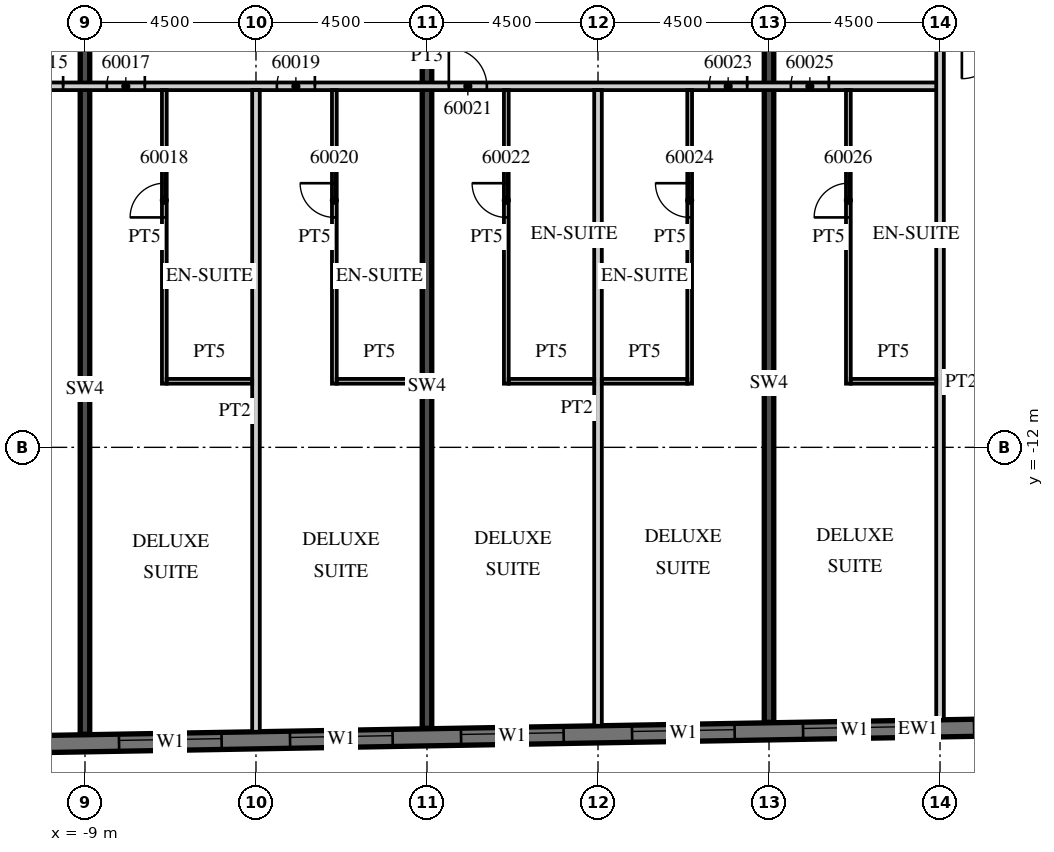
"""IFC4 building model, lengths in metres.
Left out: names, types, materials, properties, quantities, classifications, styles, units other than length and angle.
Written with IfcOpenShell. Run it as: python <this file> out.ifc"""

import sys

from ifc_helpers import new_model, si_unit, direction, frame, frame_2d, origin, place, context, subcontext, project, spatial, rectangle, extrude, element, fill, save


model = new_model("IFC4")
c1 = context("Model", 3, precision=1e-05, world=origin(), true_north=direction((0.0, 1.0)))
c2 = subcontext(c1, "Body", "Model", "MODEL_VIEW")
j1 = project(units=[si_unit("LENGTHUNIT", "METRE"), si_unit("PLANEANGLEUNIT", "RADIAN")], contexts=[c1])
p1 = place(None, origin())
s1 = spatial("IfcSite", under=j1, at=p1, CompositionType="ELEMENT")
p2 = place(p1, origin())
s2 = spatial("IfcBuilding", under=s1, at=p2, CompositionType="ELEMENT")
p3 = place(p2, frame((0.0, 0.0, 244.1)))
s3 = spatial("IfcBuildingStorey", under=s2, at=p3, CompositionType="ELEMENT", Elevation=244.1)
p4 = place(p3, frame((-9.0, -19.55, 0.0), z_axis=(0.0, 0.0, 1.0), x_axis=(0.0, 1.0, 0.0)))
e1 = element("IfcWall", 1, at=p4, inside=s3, PredefinedType="SHEAR", context=c2, shape_type="SweptSolid", body=[
    extrude(rectangle(XDim=18.15, YDim=0.25, at=frame_2d((9.075, 0.0))), origin(), (0.0, 0.0, 1.0), 3.3),
])
p5 = place(p3, frame((0.0, -19.393, 0.0), z_axis=(0.0, 0.0, 1.0), x_axis=(0.0, 1.0, 0.0)))
e2 = element("IfcWall", 2, at=p5, inside=s3, PredefinedType="SHEAR", context=c2, shape_type="SweptSolid", body=[
    extrude(rectangle(XDim=17.993, YDim=0.25, at=frame_2d((8.997, 0.0))), origin(), (0.0, 0.0, 1.0), 3.3),
])
p6 = place(p3, frame((9.0, -19.236, 0.0), z_axis=(0.0, 0.0, 1.0), x_axis=(0.0, 1.0, 0.0)))
e3 = element("IfcWall", 3, at=p6, inside=s3, PredefinedType="SHEAR", context=c2, shape_type="SweptSolid", body=[
    extrude(rectangle(XDim=17.836, YDim=0.25, at=frame_2d((8.918, 0.0))), origin(), (0.0, 0.0, 1.0), 3.3),
])
p7 = place(p3, frame((-13.504, -19.866, 0.0), z_axis=(0.0, 0.0, 1.0), x_axis=(0.999847672978, 0.017453676992, 0.0)))
e4 = element("IfcWall", 4, at=p7, inside=s3, PredefinedType="SOLIDWALL", context=c2, shape_type="SweptSolid", body=[
    extrude(rectangle(XDim=52.86, YDim=0.45, at=frame_2d((26.43, 0.0))), origin(), (0.0, 0.0, 1.0), 3.02),
])
p8 = place(p7, frame((0.9, 0.0, 0.45)))
e5 = element("IfcOpeningElement", 5, at=p8, cuts=e4, PredefinedType="OPENING", context=c2, shape_type="SweptSolid", body=[
    extrude(rectangle(XDim=2.7, YDim=2.25, at=frame_2d((1.35, 1.125))), frame((0.0, 0.235, 0.0), z_axis=(0.0, -1.0, 0.0), x_axis=(1.0, 0.0, 0.0)), (0.0, 0.0, 1.0), 0.47),
])
p9 = place(p7, frame((5.401, 0.0, 0.45)))
e6 = element("IfcOpeningElement", 6, at=p9, cuts=e4, PredefinedType="OPENING", context=c2, shape_type="SweptSolid", body=[
    extrude(rectangle(XDim=2.7, YDim=2.25, at=frame_2d((1.35, 1.125))), frame((0.0, 0.235, 0.0), z_axis=(0.0, -1.0, 0.0), x_axis=(1.0, 0.0, 0.0)), (0.0, 0.0, 1.0), 0.47),
])
p10 = place(p7, frame((9.902, 0.0, 0.45)))
e7 = element("IfcOpeningElement", 7, at=p10, cuts=e4, PredefinedType="OPENING", context=c2, shape_type="SweptSolid", body=[
    extrude(rectangle(XDim=2.7, YDim=2.25, at=frame_2d((1.35, 1.125))), frame((0.0, 0.235, 0.0), z_axis=(0.0, -1.0, 0.0), x_axis=(1.0, 0.0, 0.0)), (0.0, 0.0, 1.0), 0.47),
])
p11 = place(p7, frame((14.402, 0.0, 0.45)))
e8 = element("IfcOpeningElement", 8, at=p11, cuts=e4, PredefinedType="OPENING", context=c2, shape_type="SweptSolid", body=[
    extrude(rectangle(XDim=2.7, YDim=2.25, at=frame_2d((1.35, 1.125))), frame((0.0, 0.235, 0.0), z_axis=(0.0, -1.0, 0.0), x_axis=(1.0, 0.0, 0.0)), (0.0, 0.0, 1.0), 0.47),
])
p12 = place(p7, frame((18.903, 0.0, 0.45)))
e9 = element("IfcOpeningElement", 9, at=p12, cuts=e4, PredefinedType="OPENING", context=c2, shape_type="SweptSolid", body=[
    extrude(rectangle(XDim=2.7, YDim=2.25, at=frame_2d((1.35, 1.125))), frame((0.0, 0.235, 0.0), z_axis=(0.0, -1.0, 0.0), x_axis=(1.0, 0.0, 0.0)), (0.0, 0.0, 1.0), 0.47),
])
p13 = place(p7, frame((23.404, 0.0, 0.45)))
e10 = element("IfcOpeningElement", 10, at=p13, cuts=e4, PredefinedType="OPENING", context=c2, shape_type="SweptSolid", body=[
    extrude(rectangle(XDim=2.7, YDim=2.25, at=frame_2d((1.35, 1.125))), frame((0.0, 0.235, 0.0), z_axis=(0.0, -1.0, 0.0), x_axis=(1.0, 0.0, 0.0)), (0.0, 0.0, 1.0), 0.47),
])
p14 = place(p7, frame((27.904, 0.0, 0.45)))
e11 = element("IfcOpeningElement", 11, at=p14, cuts=e4, PredefinedType="OPENING", context=c2, shape_type="SweptSolid", body=[
    extrude(rectangle(XDim=2.7, YDim=2.25, at=frame_2d((1.35, 1.125))), frame((0.0, 0.235, 0.0), z_axis=(0.0, -1.0, 0.0), x_axis=(1.0, 0.0, 0.0)), (0.0, 0.0, 1.0), 0.47),
])
p15 = place(p7, frame((32.405, 0.0, 0.45)))
e12 = element("IfcOpeningElement", 12, at=p15, cuts=e4, PredefinedType="OPENING", context=c2, shape_type="SweptSolid", body=[
    extrude(rectangle(XDim=2.7, YDim=2.25, at=frame_2d((1.35, 1.125))), frame((0.0, 0.235, 0.0), z_axis=(0.0, -1.0, 0.0), x_axis=(1.0, 0.0, 0.0)), (0.0, 0.0, 1.0), 0.47),
])
p16 = place(p7, frame((36.906, 0.0, 0.45)))
e13 = element("IfcOpeningElement", 13, at=p16, cuts=e4, PredefinedType="OPENING", context=c2, shape_type="SweptSolid", body=[
    extrude(rectangle(XDim=2.7, YDim=2.25, at=frame_2d((1.35, 1.125))), frame((0.0, 0.235, 0.0), z_axis=(0.0, -1.0, 0.0), x_axis=(1.0, 0.0, 0.0)), (0.0, 0.0, 1.0), 0.47),
])
p17 = place(p7, frame((41.406, 0.0, 0.45)))
e14 = element("IfcOpeningElement", 14, at=p17, cuts=e4, PredefinedType="OPENING", context=c2, shape_type="SweptSolid", body=[
    extrude(rectangle(XDim=2.7, YDim=2.25, at=frame_2d((1.35, 1.125))), frame((0.0, 0.235, 0.0), z_axis=(0.0, -1.0, 0.0), x_axis=(1.0, 0.0, 0.0)), (0.0, 0.0, 1.0), 0.47),
])
p18 = place(p7, frame((45.907, 0.0, 0.45)))
e15 = element("IfcOpeningElement", 15, at=p18, cuts=e4, PredefinedType="OPENING", context=c2, shape_type="SweptSolid", body=[
    extrude(rectangle(XDim=2.7, YDim=2.25, at=frame_2d((1.35, 1.125))), frame((0.0, 0.235, 0.0), z_axis=(0.0, -1.0, 0.0), x_axis=(1.0, 0.0, 0.0)), (0.0, 0.0, 1.0), 0.47),
])
p19 = place(p3, frame((-13.5, -2.5, 0.0), z_axis=(0.0, 0.0, 1.0), x_axis=(1.0, 0.0, 0.0)))
e16 = element("IfcWall", 16, at=p19, inside=s3, PredefinedType="PARTITIONING", context=c2, shape_type="SweptSolid", body=[
    extrude(rectangle(XDim=27.0, YDim=0.2, at=frame_2d((13.5, 0.0))), origin(), (0.0, 0.0, 1.0), 3.02),
])
p20 = place(p19, frame((2.925, 0.0, 0.0)))
e17 = element("IfcOpeningElement", 17, at=p20, cuts=e16, PredefinedType="OPENING", context=c2, shape_type="SweptSolid", body=[
    extrude(rectangle(XDim=1.0, YDim=2.1, at=frame_2d((0.5, 1.05))), frame((0.0, 0.11, 0.0), z_axis=(0.0, -1.0, 0.0), x_axis=(1.0, 0.0, 0.0)), (0.0, 0.0, 1.0), 0.22),
])
p21 = place(p19, frame((5.075, 0.0, 0.0)))
e18 = element("IfcOpeningElement", 18, at=p21, cuts=e16, PredefinedType="OPENING", context=c2, shape_type="SweptSolid", body=[
    extrude(rectangle(XDim=1.0, YDim=2.1, at=frame_2d((0.5, 1.05))), frame((0.0, 0.11, 0.0), z_axis=(0.0, -1.0, 0.0), x_axis=(1.0, 0.0, 0.0)), (0.0, 0.0, 1.0), 0.22),
])
p22 = place(p19, frame((9.55, 0.0, 0.0)))
e19 = element("IfcOpeningElement", 19, at=p22, cuts=e16, PredefinedType="OPENING", context=c2, shape_type="SweptSolid", body=[
    extrude(rectangle(XDim=1.0, YDim=2.1, at=frame_2d((0.5, 1.05))), frame((0.0, 0.11, 0.0), z_axis=(0.0, -1.0, 0.0), x_axis=(1.0, 0.0, 0.0)), (0.0, 0.0, 1.0), 0.22),
])
p23 = place(p19, frame((14.075, 0.0, 0.0)))
e20 = element("IfcOpeningElement", 20, at=p23, cuts=e16, PredefinedType="OPENING", context=c2, shape_type="SweptSolid", body=[
    extrude(rectangle(XDim=1.0, YDim=2.1, at=frame_2d((0.5, 1.05))), frame((0.0, 0.11, 0.0), z_axis=(0.0, -1.0, 0.0), x_axis=(1.0, 0.0, 0.0)), (0.0, 0.0, 1.0), 0.22),
])
p24 = place(p19, frame((20.925, 0.0, 0.0)))
e21 = element("IfcOpeningElement", 21, at=p24, cuts=e16, PredefinedType="OPENING", context=c2, shape_type="SweptSolid", body=[
    extrude(rectangle(XDim=1.0, YDim=2.1, at=frame_2d((0.5, 1.05))), frame((0.0, 0.11, 0.0), z_axis=(0.0, -1.0, 0.0), x_axis=(1.0, 0.0, 0.0)), (0.0, 0.0, 1.0), 0.22),
])
p25 = place(p19, frame((23.075, 0.0, 0.0)))
e22 = element("IfcOpeningElement", 22, at=p25, cuts=e16, PredefinedType="OPENING", context=c2, shape_type="SweptSolid", body=[
    extrude(rectangle(XDim=1.0, YDim=2.1, at=frame_2d((0.5, 1.05))), frame((0.0, 0.11, 0.0), z_axis=(0.0, -1.0, 0.0), x_axis=(1.0, 0.0, 0.0)), (0.0, 0.0, 1.0), 0.22),
])
p26 = place(p3, frame((-4.5, -19.484, 0.0), z_axis=(0.0, 0.0, 1.0), x_axis=(0.0, 1.0, 0.0)))
e23 = element("IfcWall", 23, at=p26, inside=s3, PredefinedType="PARTITIONING", context=c2, shape_type="SweptSolid", body=[
    extrude(rectangle(XDim=16.884, YDim=0.2, at=frame_2d((8.442, 0.0))), origin(), (0.0, 0.0, 1.0), 3.02),
])
p27 = place(p3, frame((-6.912, -10.325, 0.0), z_axis=(0.0, 0.0, 1.0), x_axis=(0.0, 1.0, 0.0)))
e24 = element("IfcWall", 24, at=p27, inside=s3, PredefinedType="PARTITIONING", context=c2, shape_type="SweptSolid", body=[
    extrude(rectangle(XDim=7.725, YDim=0.125, at=frame_2d((3.862, 0.0))), origin(), (0.0, 0.0, 1.0), 3.02),
])
p28 = place(p27, frame((4.375, 0.0, 0.0)))
e25 = element("IfcOpeningElement", 25, at=p28, cuts=e24, PredefinedType="OPENING", context=c2, shape_type="SweptSolid", body=[
    extrude(rectangle(XDim=0.9, YDim=2.1, at=frame_2d((0.45, 1.05))), frame((0.0, 0.073, 0.0), z_axis=(0.0, -1.0, 0.0), x_axis=(1.0, 0.0, 0.0)), (0.0, 0.0, 1.0), 0.145),
])
p29 = place(p3, frame((-6.85, -10.262, 0.0), z_axis=(0.0, 0.0, 1.0), x_axis=(1.0, 0.0, 0.0)))
e26 = element("IfcWall", 26, at=p29, inside=s3, PredefinedType="PARTITIONING", context=c2, shape_type="SweptSolid", body=[
    extrude(rectangle(XDim=2.25, YDim=0.125, at=frame_2d((1.125, 0.0))), origin(), (0.0, 0.0, 1.0), 3.02),
])
p30 = place(p3, frame((-2.438, -10.325, 0.0), z_axis=(0.0, 0.0, 1.0), x_axis=(0.0, 1.0, 0.0)))
e27 = element("IfcWall", 27, at=p30, inside=s3, PredefinedType="PARTITIONING", context=c2, shape_type="SweptSolid", body=[
    extrude(rectangle(XDim=7.725, YDim=0.125, at=frame_2d((3.862, 0.0))), origin(), (0.0, 0.0, 1.0), 3.02),
])
p31 = place(p30, frame((4.375, 0.0, 0.0)))
e28 = element("IfcOpeningElement", 28, at=p31, cuts=e27, PredefinedType="OPENING", context=c2, shape_type="SweptSolid", body=[
    extrude(rectangle(XDim=0.9, YDim=2.1, at=frame_2d((0.45, 1.05))), frame((0.0, 0.073, 0.0), z_axis=(0.0, -1.0, 0.0), x_axis=(1.0, 0.0, 0.0)), (0.0, 0.0, 1.0), 0.145),
])
p32 = place(p3, frame((-2.375, -10.262, 0.0), z_axis=(0.0, 0.0, 1.0), x_axis=(1.0, 0.0, 0.0)))
e29 = element("IfcWall", 29, at=p32, inside=s3, PredefinedType="PARTITIONING", context=c2, shape_type="SweptSolid", body=[
    extrude(rectangle(XDim=2.25, YDim=0.125, at=frame_2d((1.125, 0.0))), origin(), (0.0, 0.0, 1.0), 3.02),
])
p33 = place(p3, frame((4.5, -19.327, 0.0), z_axis=(0.0, 0.0, 1.0), x_axis=(0.0, 1.0, 0.0)))
e30 = element("IfcWall", 30, at=p33, inside=s3, PredefinedType="PARTITIONING", context=c2, shape_type="SweptSolid", body=[
    extrude(rectangle(XDim=16.727, YDim=0.2, at=frame_2d((8.363, 0.0))), origin(), (0.0, 0.0, 1.0), 3.02),
])
p34 = place(p3, frame((2.087, -10.325, 0.0), z_axis=(0.0, 0.0, 1.0), x_axis=(0.0, 1.0, 0.0)))
e31 = element("IfcWall", 31, at=p34, inside=s3, PredefinedType="PARTITIONING", context=c2, shape_type="SweptSolid", body=[
    extrude(rectangle(XDim=7.725, YDim=0.125, at=frame_2d((3.862, 0.0))), origin(), (0.0, 0.0, 1.0), 3.02),
])
p35 = place(p34, frame((4.375, 0.0, 0.0)))
e32 = element("IfcOpeningElement", 32, at=p35, cuts=e31, PredefinedType="OPENING", context=c2, shape_type="SweptSolid", body=[
    extrude(rectangle(XDim=0.9, YDim=2.1, at=frame_2d((0.45, 1.05))), frame((0.0, 0.073, 0.0), z_axis=(0.0, -1.0, 0.0), x_axis=(1.0, 0.0, 0.0)), (0.0, 0.0, 1.0), 0.145),
])
p36 = place(p3, frame((2.15, -10.262, 0.0), z_axis=(0.0, 0.0, 1.0), x_axis=(1.0, 0.0, 0.0)))
e33 = element("IfcWall", 33, at=p36, inside=s3, PredefinedType="PARTITIONING", context=c2, shape_type="SweptSolid", body=[
    extrude(rectangle(XDim=2.25, YDim=0.125, at=frame_2d((1.125, 0.0))), origin(), (0.0, 0.0, 1.0), 3.02),
])
p37 = place(p3, frame((6.912, -10.325, 0.0), z_axis=(0.0, 0.0, 1.0), x_axis=(0.0, 1.0, 0.0)))
e34 = element("IfcWall", 34, at=p37, inside=s3, PredefinedType="PARTITIONING", context=c2, shape_type="SweptSolid", body=[
    extrude(rectangle(XDim=7.725, YDim=0.125, at=frame_2d((3.862, 0.0))), origin(), (0.0, 0.0, 1.0), 3.02),
])
p38 = place(p37, frame((4.375, 0.0, 0.0)))
e35 = element("IfcOpeningElement", 35, at=p38, cuts=e34, PredefinedType="OPENING", context=c2, shape_type="SweptSolid", body=[
    extrude(rectangle(XDim=0.9, YDim=2.1, at=frame_2d((0.45, 1.05))), frame((0.0, 0.073, 0.0), z_axis=(0.0, -1.0, 0.0), x_axis=(1.0, 0.0, 0.0)), (0.0, 0.0, 1.0), 0.145),
])
p39 = place(p3, frame((4.6, -10.262, 0.0), z_axis=(0.0, 0.0, 1.0), x_axis=(1.0, 0.0, 0.0)))
e36 = element("IfcWall", 36, at=p39, inside=s3, PredefinedType="PARTITIONING", context=c2, shape_type="SweptSolid", body=[
    extrude(rectangle(XDim=2.25, YDim=0.125, at=frame_2d((1.125, 0.0))), origin(), (0.0, 0.0, 1.0), 3.02),
])
p40 = place(p3, frame((13.5, -19.17, 0.0), z_axis=(0.0, 0.0, 1.0), x_axis=(0.0, 1.0, 0.0)))
e37 = element("IfcWall", 37, at=p40, inside=s3, PredefinedType="PARTITIONING", context=c2, shape_type="SweptSolid", body=[
    extrude(rectangle(XDim=17.77, YDim=0.2, at=frame_2d((8.885, 0.0))), origin(), (0.0, 0.0, 1.0), 3.02),
])
p41 = place(p3, frame((11.088, -10.325, 0.0), z_axis=(0.0, 0.0, 1.0), x_axis=(0.0, 1.0, 0.0)))
e38 = element("IfcWall", 38, at=p41, inside=s3, PredefinedType="PARTITIONING", context=c2, shape_type="SweptSolid", body=[
    extrude(rectangle(XDim=7.725, YDim=0.125, at=frame_2d((3.862, 0.0))), origin(), (0.0, 0.0, 1.0), 3.02),
])
p42 = place(p41, frame((4.375, 0.0, 0.0)))
e39 = element("IfcOpeningElement", 39, at=p42, cuts=e38, PredefinedType="OPENING", context=c2, shape_type="SweptSolid", body=[
    extrude(rectangle(XDim=0.9, YDim=2.1, at=frame_2d((0.45, 1.05))), frame((0.0, 0.073, 0.0), z_axis=(0.0, -1.0, 0.0), x_axis=(1.0, 0.0, 0.0)), (0.0, 0.0, 1.0), 0.145),
])
p43 = place(p3, frame((11.15, -10.262, 0.0), z_axis=(0.0, 0.0, 1.0), x_axis=(1.0, 0.0, 0.0)))
e40 = element("IfcWall", 40, at=p43, inside=s3, PredefinedType="PARTITIONING", context=c2, shape_type="SweptSolid", body=[
    extrude(rectangle(XDim=2.25, YDim=0.125, at=frame_2d((1.125, 0.0))), origin(), (0.0, 0.0, 1.0), 3.02),
])
p44 = place(p9, origin())
e41 = element("IfcWindow", 41, at=p44, inside=s3, PartitioningType="SINGLE_PANEL", PredefinedType="WINDOW", context=c2, shape_type="SweptSolid", body=[
    extrude(rectangle(XDim=2.7, YDim=2.25, at=frame_2d((1.35, 1.125))), frame((0.0, 0.09, 0.0), z_axis=(0.0, -1.0, 0.0), x_axis=(1.0, 0.0, 0.0)), (0.0, 0.0, 1.0), 0.06),
])
fill(e6, e41)
p45 = place(p10, origin())
e42 = element("IfcWindow", 42, at=p45, inside=s3, PartitioningType="SINGLE_PANEL", PredefinedType="WINDOW", context=c2, shape_type="SweptSolid", body=[
    extrude(rectangle(XDim=2.7, YDim=2.25, at=frame_2d((1.35, 1.125))), frame((0.0, 0.09, 0.0), z_axis=(0.0, -1.0, 0.0), x_axis=(1.0, 0.0, 0.0)), (0.0, 0.0, 1.0), 0.06),
])
fill(e7, e42)
p46 = place(p11, origin())
e43 = element("IfcWindow", 43, at=p46, inside=s3, PartitioningType="SINGLE_PANEL", PredefinedType="WINDOW", context=c2, shape_type="SweptSolid", body=[
    extrude(rectangle(XDim=2.7, YDim=2.25, at=frame_2d((1.35, 1.125))), frame((0.0, 0.09, 0.0), z_axis=(0.0, -1.0, 0.0), x_axis=(1.0, 0.0, 0.0)), (0.0, 0.0, 1.0), 0.06),
])
fill(e8, e43)
p47 = place(p12, origin())
e44 = element("IfcWindow", 44, at=p47, inside=s3, PartitioningType="SINGLE_PANEL", PredefinedType="WINDOW", context=c2, shape_type="SweptSolid", body=[
    extrude(rectangle(XDim=2.7, YDim=2.25, at=frame_2d((1.35, 1.125))), frame((0.0, 0.09, 0.0), z_axis=(0.0, -1.0, 0.0), x_axis=(1.0, 0.0, 0.0)), (0.0, 0.0, 1.0), 0.06),
])
fill(e9, e44)
p48 = place(p13, origin())
e45 = element("IfcWindow", 45, at=p48, inside=s3, PartitioningType="SINGLE_PANEL", PredefinedType="WINDOW", context=c2, shape_type="SweptSolid", body=[
    extrude(rectangle(XDim=2.7, YDim=2.25, at=frame_2d((1.35, 1.125))), frame((0.0, 0.09, 0.0), z_axis=(0.0, -1.0, 0.0), x_axis=(1.0, 0.0, 0.0)), (0.0, 0.0, 1.0), 0.06),
])
fill(e10, e45)
p49 = place(p14, origin())
e46 = element("IfcWindow", 46, at=p49, inside=s3, PartitioningType="SINGLE_PANEL", PredefinedType="WINDOW", context=c2, shape_type="SweptSolid", body=[
    extrude(rectangle(XDim=2.7, YDim=2.25, at=frame_2d((1.35, 1.125))), frame((0.0, 0.09, 0.0), z_axis=(0.0, -1.0, 0.0), x_axis=(1.0, 0.0, 0.0)), (0.0, 0.0, 1.0), 0.06),
])
fill(e11, e46)
p50 = place(p20, origin())
e47 = element("IfcDoor", 47, at=p50, inside=s3, OperationType="SINGLE_SWING_RIGHT", PredefinedType="DOOR", context=c2, shape_type="SweptSolid", body=[
    extrude(rectangle(XDim=1.0, YDim=2.1, at=frame_2d((0.5, 1.05))), frame((0.0, 0.025, 0.0), z_axis=(0.0, -1.0, 0.0), x_axis=(1.0, 0.0, 0.0)), (0.0, 0.0, 1.0), 0.05),
])
fill(e17, e47)
p51 = place(p21, origin())
e48 = element("IfcDoor", 48, at=p51, inside=s3, OperationType="SINGLE_SWING_RIGHT", PredefinedType="DOOR", context=c2, shape_type="SweptSolid", body=[
    extrude(rectangle(XDim=1.0, YDim=2.1, at=frame_2d((0.5, 1.05))), frame((0.0, 0.025, 0.0), z_axis=(0.0, -1.0, 0.0), x_axis=(1.0, 0.0, 0.0)), (0.0, 0.0, 1.0), 0.05),
])
fill(e18, e48)
p52 = place(p28, origin())
e49 = element("IfcDoor", 49, at=p52, inside=s3, OperationType="SINGLE_SWING_LEFT", PredefinedType="DOOR", context=c2, shape_type="SweptSolid", body=[
    extrude(rectangle(XDim=0.9, YDim=2.1, at=frame_2d((0.45, 1.05))), frame((0.0, 0.025, 0.0), z_axis=(0.0, -1.0, 0.0), x_axis=(1.0, 0.0, 0.0)), (0.0, 0.0, 1.0), 0.05),
])
fill(e25, e49)
p53 = place(p22, origin())
e50 = element("IfcDoor", 50, at=p53, inside=s3, OperationType="SINGLE_SWING_RIGHT", PredefinedType="DOOR", context=c2, shape_type="SweptSolid", body=[
    extrude(rectangle(XDim=1.0, YDim=2.1, at=frame_2d((0.5, 1.05))), frame((0.0, 0.025, 0.0), z_axis=(0.0, -1.0, 0.0), x_axis=(1.0, 0.0, 0.0)), (0.0, 0.0, 1.0), 0.05),
])
fill(e19, e50)
p54 = place(p31, origin())
e51 = element("IfcDoor", 51, at=p54, inside=s3, OperationType="SINGLE_SWING_RIGHT", PredefinedType="DOOR", context=c2, shape_type="SweptSolid", body=[
    extrude(rectangle(XDim=0.9, YDim=2.1, at=frame_2d((0.45, 1.05))), frame((0.0, 0.025, 0.0), z_axis=(0.0, -1.0, 0.0), x_axis=(1.0, 0.0, 0.0)), (0.0, 0.0, 1.0), 0.05),
])
fill(e28, e51)
p55 = place(p23, origin())
e52 = element("IfcDoor", 52, at=p55, inside=s3, OperationType="SINGLE_SWING_LEFT", PredefinedType="DOOR", context=c2, shape_type="SweptSolid", body=[
    extrude(rectangle(XDim=1.0, YDim=2.1, at=frame_2d((0.5, 1.05))), frame((0.0, 0.025, 0.0), z_axis=(0.0, -1.0, 0.0), x_axis=(1.0, 0.0, 0.0)), (0.0, 0.0, 1.0), 0.05),
])
fill(e20, e52)
p56 = place(p35, origin())
e53 = element("IfcDoor", 53, at=p56, inside=s3, OperationType="SINGLE_SWING_RIGHT", PredefinedType="DOOR", context=c2, shape_type="SweptSolid", body=[
    extrude(rectangle(XDim=0.9, YDim=2.1, at=frame_2d((0.45, 1.05))), frame((0.0, 0.025, 0.0), z_axis=(0.0, -1.0, 0.0), x_axis=(1.0, 0.0, 0.0)), (0.0, 0.0, 1.0), 0.05),
])
fill(e32, e53)
p57 = place(p24, origin())
e54 = element("IfcDoor", 54, at=p57, inside=s3, OperationType="SINGLE_SWING_RIGHT", PredefinedType="DOOR", context=c2, shape_type="SweptSolid", body=[
    extrude(rectangle(XDim=1.0, YDim=2.1, at=frame_2d((0.5, 1.05))), frame((0.0, 0.025, 0.0), z_axis=(0.0, -1.0, 0.0), x_axis=(1.0, 0.0, 0.0)), (0.0, 0.0, 1.0), 0.05),
])
fill(e21, e54)
p58 = place(p38, origin())
e55 = element("IfcDoor", 55, at=p58, inside=s3, OperationType="SINGLE_SWING_RIGHT", PredefinedType="DOOR", context=c2, shape_type="SweptSolid", body=[
    extrude(rectangle(XDim=0.9, YDim=2.1, at=frame_2d((0.45, 1.05))), frame((0.0, 0.025, 0.0), z_axis=(0.0, -1.0, 0.0), x_axis=(1.0, 0.0, 0.0)), (0.0, 0.0, 1.0), 0.05),
])
fill(e35, e55)
p59 = place(p25, origin())
e56 = element("IfcDoor", 56, at=p59, inside=s3, OperationType="SINGLE_SWING_RIGHT", PredefinedType="DOOR", context=c2, shape_type="SweptSolid", body=[
    extrude(rectangle(XDim=1.0, YDim=2.1, at=frame_2d((0.5, 1.05))), frame((0.0, 0.025, 0.0), z_axis=(0.0, -1.0, 0.0), x_axis=(1.0, 0.0, 0.0)), (0.0, 0.0, 1.0), 0.05),
])
fill(e22, e56)
p60 = place(p42, origin())
e57 = element("IfcDoor", 57, at=p60, inside=s3, OperationType="SINGLE_SWING_LEFT", PredefinedType="DOOR", context=c2, shape_type="SweptSolid", body=[
    extrude(rectangle(XDim=0.9, YDim=2.1, at=frame_2d((0.45, 1.05))), frame((0.0, 0.025, 0.0), z_axis=(0.0, -1.0, 0.0), x_axis=(1.0, 0.0, 0.0)), (0.0, 0.0, 1.0), 0.05),
])
fill(e39, e57)
save(model, sys.argv[1])
